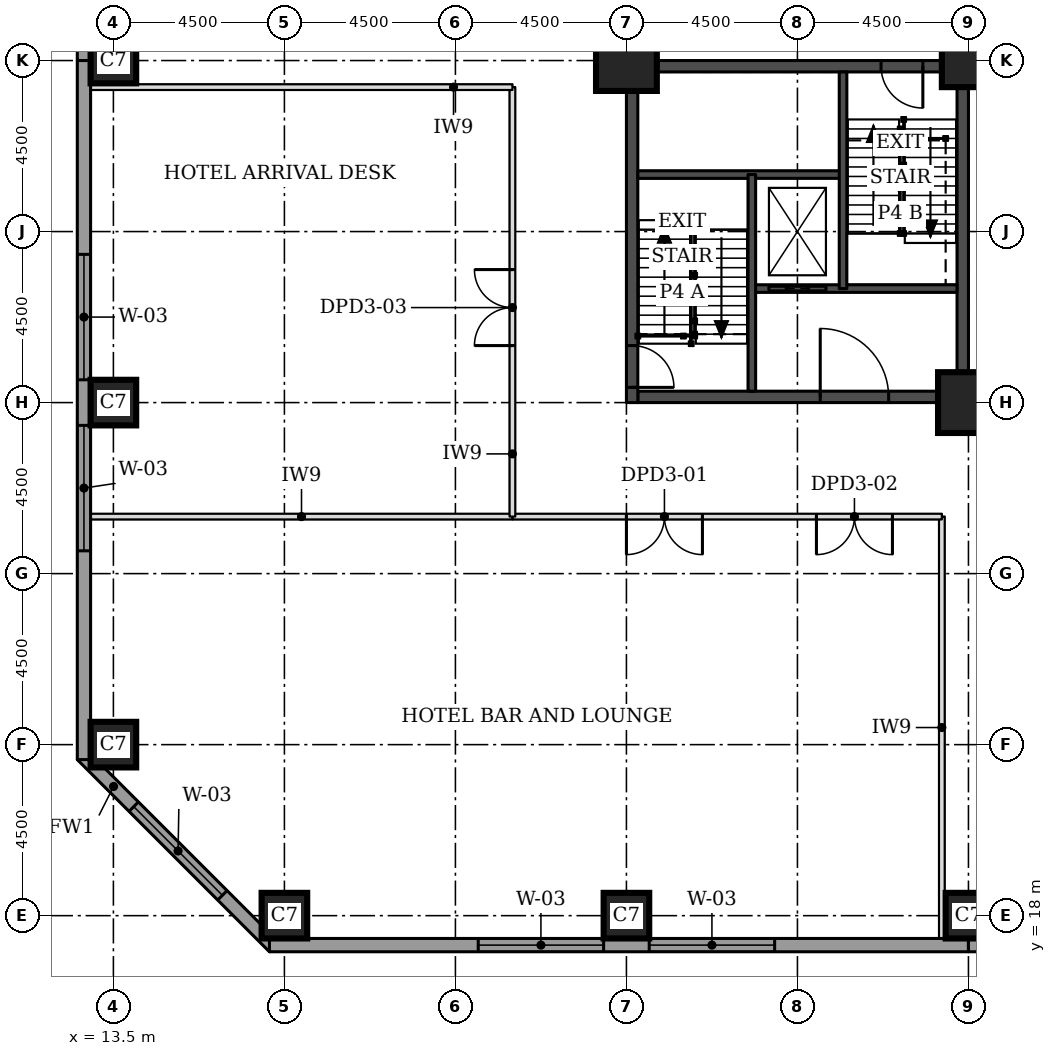
"""IFC4 building model, lengths in metres.
Left out: names, types, materials, properties, quantities, classifications, styles, units other than length and angle.
Written with IfcOpenShell. Run it as: python <this file> out.ifc"""

import sys

from ifc_helpers import new_model, si_unit, direction, frame, frame_2d, origin, origin_2d, place, context, subcontext, project, spatial, rectangle, extrude, element, fill, save


model = new_model("IFC4")
c1 = context("Model", 3, precision=1e-05, world=origin(), true_north=direction((0.0, 1.0)))
c2 = subcontext(c1, "Body", "Model", "MODEL_VIEW")
j1 = project(units=[si_unit("LENGTHUNIT", "METRE"), si_unit("PLANEANGLEUNIT", "RADIAN")], contexts=[c1])
p1 = place(None, origin())
s1 = spatial("IfcSite", under=j1, at=p1, CompositionType="ELEMENT")
p2 = place(p1, origin())
s2 = spatial("IfcBuilding", under=s1, at=p2, CompositionType="ELEMENT")
p3 = place(p2, frame((0.0, 0.0, 18.5)))
s3 = spatial("IfcBuildingStorey", under=s2, at=p3, CompositionType="ELEMENT", Elevation=18.5)
for number, where, z_axis, x_axis in (
    (1, (18.0, 18.0, 0.0), (0.0, 0.0, 1.0), (1.0, 0.0, 0.0)),
    (2, (27.0, 18.0, 0.0), (0.0, 0.0, 1.0), (1.0, 0.0, 0.0)),
    (3, (36.0, 18.0, 0.0), (0.0, 0.0, 1.0), (1.0, 0.0, 0.0)),
    (4, (13.5, 22.5, 0.0), (0.0, 0.0, 1.0), (1.0, 0.0, 0.0)),
    (5, (13.5, 31.5, 0.0), (0.0, 0.0, 1.0), (1.0, 0.0, 0.0)),
):
    element("IfcColumn", number, at=place(p3, frame(where, z_axis=z_axis, x_axis=x_axis)), inside=s3, PredefinedType="COLUMN", context=c2, shape_type="SweptSolid", body=[
        extrude(rectangle(XDim=1.2, YDim=1.2, at=origin_2d()), origin(), (0.0, 0.0, 1.0), 4.6),
    ])
p4 = place(p3, frame((36.0, 31.5, 0.0), z_axis=(0.0, 0.0, 1.0), x_axis=(1.0, 0.0, 0.0)))
e6 = element("IfcColumn", 6, at=p4, inside=s3, PredefinedType="COLUMN", context=c2, shape_type="SweptSolid", body=[
    extrude(rectangle(XDim=1.6, YDim=1.6, at=origin_2d()), origin(), (0.0, 0.0, 1.0), 4.6),
])
p5 = place(p3, frame((13.5, 40.5, 0.0), z_axis=(0.0, 0.0, 1.0), x_axis=(1.0, 0.0, 0.0)))
e7 = element("IfcColumn", 7, at=p5, inside=s3, PredefinedType="COLUMN", context=c2, shape_type="SweptSolid", body=[
    extrude(rectangle(XDim=1.2, YDim=1.2, at=origin_2d()), origin(), (0.0, 0.0, 1.0), 4.6),
])
p6 = place(p3, frame((27.0, 40.5, 0.0), z_axis=(0.0, 0.0, 1.0), x_axis=(1.0, 0.0, 0.0)))
e8 = element("IfcColumn", 8, at=p6, inside=s3, PredefinedType="COLUMN", context=c2, shape_type="SweptSolid", body=[
    extrude(rectangle(XDim=1.6, YDim=1.6, at=origin_2d()), origin(), (0.0, 0.0, 1.0), 4.6),
])
p7 = place(p3, frame((36.0, 40.5, 0.0), z_axis=(0.0, 0.0, 1.0), x_axis=(1.0, 0.0, 0.0)))
e9 = element("IfcColumn", 9, at=p7, inside=s3, PredefinedType="COLUMN", context=c2, shape_type="SweptSolid", body=[
    extrude(rectangle(XDim=1.4, YDim=1.4, at=origin_2d()), origin(), (0.0, 0.0, 1.0), 4.6),
])
p8 = place(p3, frame((27.3, 31.65, 0.0), z_axis=(0.0, 0.0, 1.0), x_axis=(1.0, 0.0, 0.0)))
e10 = element("IfcWall", 10, at=p8, inside=s3, PredefinedType="SHEAR", context=c2, shape_type="SweptSolid", body=[
    extrude(rectangle(XDim=8.4, YDim=0.3, at=frame_2d((4.2, 0.0))), origin(), (0.0, 0.0, 1.0), 4.6),
])
p9 = place(p8, frame((4.8, 0.0, 0.0)))
e11 = element("IfcOpeningElement", 11, at=p9, cuts=e10, PredefinedType="OPENING", context=c2, shape_type="SweptSolid", body=[
    extrude(rectangle(XDim=1.8, YDim=2.1, at=frame_2d((0.9, 1.05))), frame((0.0, 0.16, 0.0), z_axis=(0.0, -1.0, 0.0), x_axis=(1.0, 0.0, 0.0)), (0.0, 0.0, 1.0), 0.32),
])
p10 = place(p3, frame((27.3, 40.35, 0.0), z_axis=(0.0, 0.0, 1.0), x_axis=(1.0, 0.0, 0.0)))
e12 = element("IfcWall", 12, at=p10, inside=s3, PredefinedType="SHEAR", context=c2, shape_type="SweptSolid", body=[
    extrude(rectangle(XDim=8.4, YDim=0.3, at=frame_2d((4.2, 0.0))), origin(), (0.0, 0.0, 1.0), 4.6),
])
p11 = place(p10, frame((6.4, 0.0, 0.0)))
e13 = element("IfcOpeningElement", 13, at=p11, cuts=e12, PredefinedType="OPENING", context=c2, shape_type="SweptSolid", body=[
    extrude(rectangle(XDim=1.1, YDim=2.1, at=frame_2d((0.55, 1.05))), frame((0.0, 0.16, 0.0), z_axis=(0.0, -1.0, 0.0), x_axis=(1.0, 0.0, 0.0)), (0.0, 0.0, 1.0), 0.32),
])
p12 = place(p3, frame((27.15, 31.5, 0.0), z_axis=(0.0, 0.0, 1.0), x_axis=(0.0, 1.0, 0.0)))
e14 = element("IfcWall", 14, at=p12, inside=s3, PredefinedType="SHEAR", context=c2, shape_type="SweptSolid", body=[
    extrude(rectangle(XDim=9.0, YDim=0.3, at=frame_2d((4.5, 0.0))), origin(), (0.0, 0.0, 1.0), 4.6),
])
p13 = place(p12, frame((0.4, 0.0, 0.0)))
e15 = element("IfcOpeningElement", 15, at=p13, cuts=e14, PredefinedType="OPENING", context=c2, shape_type="SweptSolid", body=[
    extrude(rectangle(XDim=1.1, YDim=2.1, at=frame_2d((0.55, 1.05))), frame((0.0, 0.16, 0.0), z_axis=(0.0, -1.0, 0.0), x_axis=(1.0, 0.0, 0.0)), (0.0, 0.0, 1.0), 0.32),
])
p14 = place(p3, frame((35.85, 31.5, 0.0), z_axis=(0.0, 0.0, 1.0), x_axis=(0.0, 1.0, 0.0)))
e16 = element("IfcWall", 16, at=p14, inside=s3, PredefinedType="SHEAR", context=c2, shape_type="SweptSolid", body=[
    extrude(rectangle(XDim=9.0, YDim=0.3, at=frame_2d((4.5, 0.0))), origin(), (0.0, 0.0, 1.0), 4.6),
])
p15 = place(p3, frame((12.674, 22.23, 0.0), z_axis=(0.0, 0.0, 1.0), x_axis=(0.707106781187, -0.707106781187, 0.0)))
e17 = element("IfcWall", 17, at=p15, inside=s3, PredefinedType="STANDARD", context=c2, shape_type="SweptSolid", body=[
    extrude(rectangle(XDim=7.151, YDim=0.35, at=frame_2d((3.576, 0.0))), origin(), (0.0, 0.0, 1.0), 4.355),
])
p16 = place(p15, frame((1.926, 0.0, 0.9)))
e18 = element("IfcOpeningElement", 18, at=p16, cuts=e17, PredefinedType="OPENING", context=c2, shape_type="SweptSolid", body=[
    extrude(rectangle(XDim=3.3, YDim=2.7, at=frame_2d((1.65, 1.35))), frame((0.0, 0.185, 0.0), z_axis=(0.0, -1.0, 0.0), x_axis=(1.0, 0.0, 0.0)), (0.0, 0.0, 1.0), 0.37),
])
p17 = place(p3, frame((17.606, 17.225, 0.0), z_axis=(0.0, 0.0, 1.0), x_axis=(1.0, 0.0, 0.0)))
e19 = element("IfcWall", 19, at=p17, inside=s3, PredefinedType="STANDARD", context=c2, shape_type="SweptSolid", body=[
    extrude(rectangle(XDim=18.394, YDim=0.35, at=frame_2d((9.197, 0.0))), origin(), (0.0, 0.0, 1.0), 4.355),
])
p18 = place(p17, frame((5.493, 0.0, 0.9)))
e20 = element("IfcOpeningElement", 20, at=p18, cuts=e19, PredefinedType="OPENING", context=c2, shape_type="SweptSolid", body=[
    extrude(rectangle(XDim=3.3, YDim=2.7, at=frame_2d((1.65, 1.35))), frame((0.0, 0.185, 0.0), z_axis=(0.0, -1.0, 0.0), x_axis=(1.0, 0.0, 0.0)), (0.0, 0.0, 1.0), 0.37),
])
p19 = place(p17, frame((9.993, 0.0, 0.9)))
e21 = element("IfcOpeningElement", 21, at=p19, cuts=e19, PredefinedType="OPENING", context=c2, shape_type="SweptSolid", body=[
    extrude(rectangle(XDim=3.3, YDim=2.7, at=frame_2d((1.65, 1.35))), frame((0.0, 0.185, 0.0), z_axis=(0.0, -1.0, 0.0), x_axis=(1.0, 0.0, 0.0)), (0.0, 0.0, 1.0), 0.37),
])
p20 = place(p3, frame((36.0, 17.225, 0.0), z_axis=(0.0, 0.0, 1.0), x_axis=(1.0, 0.0, 0.0)))
e22 = element("IfcWall", 22, at=p20, inside=s3, PredefinedType="STANDARD", context=c2, shape_type="SweptSolid", body=[
    extrude(rectangle(XDim=18.394, YDim=0.35, at=frame_2d((9.197, 0.0))), origin(), (0.0, 0.0, 1.0), 4.355),
])
p21 = place(p20, frame((0.6, 0.0, 0.9)))
e23 = element("IfcOpeningElement", 23, at=p21, cuts=e22, PredefinedType="OPENING", context=c2, shape_type="SweptSolid", body=[
    extrude(rectangle(XDim=3.3, YDim=2.7, at=frame_2d((1.65, 1.35))), frame((0.0, 0.185, 0.0), z_axis=(0.0, -1.0, 0.0), x_axis=(1.0, 0.0, 0.0)), (0.0, 0.0, 1.0), 0.37),
])
p22 = place(p20, frame((5.1, 0.0, 0.9)))
e24 = element("IfcOpeningElement", 24, at=p22, cuts=e22, PredefinedType="OPENING", context=c2, shape_type="SweptSolid", body=[
    extrude(rectangle(XDim=3.3, YDim=2.7, at=frame_2d((1.65, 1.35))), frame((0.0, 0.185, 0.0), z_axis=(0.0, -1.0, 0.0), x_axis=(1.0, 0.0, 0.0)), (0.0, 0.0, 1.0), 0.37),
])
p23 = place(p20, frame((9.6, 0.0, 0.9)))
e25 = element("IfcOpeningElement", 25, at=p23, cuts=e22, PredefinedType="OPENING", context=c2, shape_type="SweptSolid", body=[
    extrude(rectangle(XDim=3.3, YDim=2.7, at=frame_2d((1.65, 1.35))), frame((0.0, 0.185, 0.0), z_axis=(0.0, -1.0, 0.0), x_axis=(1.0, 0.0, 0.0)), (0.0, 0.0, 1.0), 0.37),
])
p24 = place(p20, frame((14.1, 0.0, 0.9)))
e26 = element("IfcOpeningElement", 26, at=p24, cuts=e22, PredefinedType="OPENING", context=c2, shape_type="SweptSolid", body=[
    extrude(rectangle(XDim=3.3, YDim=2.7, at=frame_2d((1.65, 1.35))), frame((0.0, 0.185, 0.0), z_axis=(0.0, -1.0, 0.0), x_axis=(1.0, 0.0, 0.0)), (0.0, 0.0, 1.0), 0.37),
])
p25 = place(p3, frame((12.725, 58.894, 0.0), z_axis=(0.0, 0.0, 1.0), x_axis=(0.0, -1.0, 0.0)))
e27 = element("IfcWall", 27, at=p25, inside=s3, PredefinedType="STANDARD", context=c2, shape_type="SweptSolid", body=[
    extrude(rectangle(XDim=18.394, YDim=0.35, at=frame_2d((9.197, 0.0))), origin(), (0.0, 0.0, 1.0), 4.355),
])
p26 = place(p25, frame((5.493, 0.0, 0.9)))
e28 = element("IfcOpeningElement", 28, at=p26, cuts=e27, PredefinedType="OPENING", context=c2, shape_type="SweptSolid", body=[
    extrude(rectangle(XDim=3.3, YDim=2.7, at=frame_2d((1.65, 1.35))), frame((0.0, 0.185, 0.0), z_axis=(0.0, -1.0, 0.0), x_axis=(1.0, 0.0, 0.0)), (0.0, 0.0, 1.0), 0.37),
])
p27 = place(p25, frame((9.993, 0.0, 0.9)))
e29 = element("IfcOpeningElement", 29, at=p27, cuts=e27, PredefinedType="OPENING", context=c2, shape_type="SweptSolid", body=[
    extrude(rectangle(XDim=3.3, YDim=2.7, at=frame_2d((1.65, 1.35))), frame((0.0, 0.185, 0.0), z_axis=(0.0, -1.0, 0.0), x_axis=(1.0, 0.0, 0.0)), (0.0, 0.0, 1.0), 0.37),
])
p28 = place(p3, frame((12.725, 40.5, 0.0), z_axis=(0.0, 0.0, 1.0), x_axis=(0.0, -1.0, 0.0)))
e30 = element("IfcWall", 30, at=p28, inside=s3, PredefinedType="STANDARD", context=c2, shape_type="SweptSolid", body=[
    extrude(rectangle(XDim=18.394, YDim=0.35, at=frame_2d((9.197, 0.0))), origin(), (0.0, 0.0, 1.0), 4.355),
])
p29 = place(p28, frame((5.1, 0.0, 0.9)))
e31 = element("IfcOpeningElement", 31, at=p29, cuts=e30, PredefinedType="OPENING", context=c2, shape_type="SweptSolid", body=[
    extrude(rectangle(XDim=3.3, YDim=2.7, at=frame_2d((1.65, 1.35))), frame((0.0, 0.185, 0.0), z_axis=(0.0, -1.0, 0.0), x_axis=(1.0, 0.0, 0.0)), (0.0, 0.0, 1.0), 0.37),
])
p30 = place(p28, frame((9.6, 0.0, 0.9)))
e32 = element("IfcOpeningElement", 32, at=p30, cuts=e30, PredefinedType="OPENING", context=c2, shape_type="SweptSolid", body=[
    extrude(rectangle(XDim=3.3, YDim=2.7, at=frame_2d((1.65, 1.35))), frame((0.0, 0.185, 0.0), z_axis=(0.0, -1.0, 0.0), x_axis=(1.0, 0.0, 0.0)), (0.0, 0.0, 1.0), 0.37),
])
for number, where, z_axis, x_axis in (
    (33, (35.3, 17.4, 0.0), (0.0, 0.0, 1.0), (0.0, 1.0, 0.0)),
    (34, (12.9, 28.5, 0.0), (0.0, 0.0, 1.0), (1.0, 0.0, 0.0)),
):
    element("IfcWall", number, at=place(p3, frame(where, z_axis=z_axis, x_axis=x_axis)), inside=s3, PredefinedType="PARTITIONING", context=c2, shape_type="SweptSolid", body=[
        extrude(rectangle(XDim=11.1, YDim=0.15, at=frame_2d((5.55, 0.0))), origin(), (0.0, 0.0, 1.0), 4.38),
    ])
p31 = place(p3, frame((24.0, 28.5, 0.0), z_axis=(0.0, 0.0, 1.0), x_axis=(1.0, 0.0, 0.0)))
e35 = element("IfcWall", 35, at=p31, inside=s3, PredefinedType="PARTITIONING", context=c2, shape_type="SweptSolid", body=[
    extrude(rectangle(XDim=11.3, YDim=0.15, at=frame_2d((5.65, 0.0))), origin(), (0.0, 0.0, 1.0), 4.38),
])
p32 = place(p31, frame((3.0, 0.0, 0.0)))
e36 = element("IfcOpeningElement", 36, at=p32, cuts=e35, PredefinedType="OPENING", context=c2, shape_type="SweptSolid", body=[
    extrude(rectangle(XDim=2.0, YDim=2.1, at=frame_2d((1.0, 1.05))), frame((0.0, 0.085, 0.0), z_axis=(0.0, -1.0, 0.0), x_axis=(1.0, 0.0, 0.0)), (0.0, 0.0, 1.0), 0.17),
])
p33 = place(p31, frame((8.0, 0.0, 0.0)))
e37 = element("IfcOpeningElement", 37, at=p33, cuts=e35, PredefinedType="OPENING", context=c2, shape_type="SweptSolid", body=[
    extrude(rectangle(XDim=2.0, YDim=2.1, at=frame_2d((1.0, 1.05))), frame((0.0, 0.085, 0.0), z_axis=(0.0, -1.0, 0.0), x_axis=(1.0, 0.0, 0.0)), (0.0, 0.0, 1.0), 0.17),
])
p34 = place(p3, frame((24.0, 28.5, 0.0), z_axis=(0.0, 0.0, 1.0), x_axis=(0.0, 1.0, 0.0)))
e38 = element("IfcWall", 38, at=p34, inside=s3, PredefinedType="PARTITIONING", context=c2, shape_type="SweptSolid", body=[
    extrude(rectangle(XDim=11.3, YDim=0.15, at=frame_2d((5.65, 0.0))), origin(), (0.0, 0.0, 1.0), 4.38),
])
p35 = place(p34, frame((4.5, 0.0, 0.0)))
e39 = element("IfcOpeningElement", 39, at=p35, cuts=e38, PredefinedType="OPENING", context=c2, shape_type="SweptSolid", body=[
    extrude(rectangle(XDim=2.0, YDim=2.1, at=frame_2d((1.0, 1.05))), frame((0.0, 0.085, 0.0), z_axis=(0.0, -1.0, 0.0), x_axis=(1.0, 0.0, 0.0)), (0.0, 0.0, 1.0), 0.17),
])
p36 = place(p3, frame((12.9, 39.8, 0.0), z_axis=(0.0, 0.0, 1.0), x_axis=(1.0, 0.0, 0.0)))
e40 = element("IfcWall", 40, at=p36, inside=s3, PredefinedType="PARTITIONING", context=c2, shape_type="SweptSolid", body=[
    extrude(rectangle(XDim=11.1, YDim=0.15, at=frame_2d((5.55, 0.0))), origin(), (0.0, 0.0, 1.0), 4.38),
])
p37 = place(p3, frame((30.3, 34.5, 0.0), z_axis=(0.0, 0.0, 1.0), x_axis=(1.0, 0.0, 0.0)))
e41 = element("IfcWall", 41, at=p37, inside=s3, PredefinedType="SOLIDWALL", context=c2, shape_type="SweptSolid", body=[
    extrude(rectangle(XDim=5.4, YDim=0.2, at=frame_2d((2.7, 0.0))), origin(), (0.0, 0.0, 1.0), 4.38),
])
p38 = place(p37, frame((0.45, 0.0, 0.0)))
e42 = element("IfcOpeningElement", 42, at=p38, cuts=e41, PredefinedType="OPENING", context=c2, shape_type="SweptSolid", body=[
    extrude(rectangle(XDim=1.5, YDim=2.1, at=frame_2d((0.75, 1.05))), frame((0.0, 0.11, 0.0), z_axis=(0.0, -1.0, 0.0), x_axis=(1.0, 0.0, 0.0)), (0.0, 0.0, 1.0), 0.22),
])
p39 = place(p3, frame((27.3, 37.5, 0.0), z_axis=(0.0, 0.0, 1.0), x_axis=(1.0, 0.0, 0.0)))
e43 = element("IfcWall", 43, at=p39, inside=s3, PredefinedType="SOLIDWALL", context=c2, shape_type="SweptSolid", body=[
    extrude(rectangle(XDim=5.4, YDim=0.2, at=frame_2d((2.7, 0.0))), origin(), (0.0, 0.0, 1.0), 4.38),
])
for number, where, z_axis, x_axis in (
    (44, (30.3, 31.8, 0.0), (0.0, 0.0, 1.0), (0.0, 1.0, 0.0)),
    (45, (32.7, 34.5, 0.0), (0.0, 0.0, 1.0), (0.0, 1.0, 0.0)),
):
    element("IfcWall", number, at=place(p3, frame(where, z_axis=z_axis, x_axis=x_axis)), inside=s3, PredefinedType="SOLIDWALL", context=c2, shape_type="SweptSolid", body=[
        extrude(rectangle(XDim=5.7, YDim=0.2, at=frame_2d((2.85, 0.0))), origin(), (0.0, 0.0, 1.0), 4.38),
    ])
p40 = place(p16, origin())
e46 = element("IfcWindow", 46, at=p40, inside=s3, PartitioningType="SINGLE_PANEL", PredefinedType="WINDOW", context=c2, shape_type="SweptSolid", body=[
    extrude(rectangle(XDim=3.3, YDim=2.7, at=frame_2d((1.65, 1.35))), frame((0.0, 0.085, 0.0), z_axis=(0.0, -1.0, 0.0), x_axis=(1.0, 0.0, 0.0)), (0.0, 0.0, 1.0), 0.06),
])
fill(e18, e46)
p41 = place(p18, origin())
e47 = element("IfcWindow", 47, at=p41, inside=s3, PartitioningType="SINGLE_PANEL", PredefinedType="WINDOW", context=c2, shape_type="SweptSolid", body=[
    extrude(rectangle(XDim=3.3, YDim=2.7, at=frame_2d((1.65, 1.35))), frame((0.0, 0.085, 0.0), z_axis=(0.0, -1.0, 0.0), x_axis=(1.0, 0.0, 0.0)), (0.0, 0.0, 1.0), 0.06),
])
fill(e20, e47)
p42 = place(p19, origin())
e48 = element("IfcWindow", 48, at=p42, inside=s3, PartitioningType="SINGLE_PANEL", PredefinedType="WINDOW", context=c2, shape_type="SweptSolid", body=[
    extrude(rectangle(XDim=3.3, YDim=2.7, at=frame_2d((1.65, 1.35))), frame((0.0, 0.085, 0.0), z_axis=(0.0, -1.0, 0.0), x_axis=(1.0, 0.0, 0.0)), (0.0, 0.0, 1.0), 0.06),
])
fill(e21, e48)
p43 = place(p29, origin())
e49 = element("IfcWindow", 49, at=p43, inside=s3, PartitioningType="SINGLE_PANEL", PredefinedType="WINDOW", context=c2, shape_type="SweptSolid", body=[
    extrude(rectangle(XDim=3.3, YDim=2.7, at=frame_2d((1.65, 1.35))), frame((0.0, 0.085, 0.0), z_axis=(0.0, -1.0, 0.0), x_axis=(1.0, 0.0, 0.0)), (0.0, 0.0, 1.0), 0.06),
])
fill(e31, e49)
p44 = place(p30, origin())
e50 = element("IfcWindow", 50, at=p44, inside=s3, PartitioningType="SINGLE_PANEL", PredefinedType="WINDOW", context=c2, shape_type="SweptSolid", body=[
    extrude(rectangle(XDim=3.3, YDim=2.7, at=frame_2d((1.65, 1.35))), frame((0.0, 0.085, 0.0), z_axis=(0.0, -1.0, 0.0), x_axis=(1.0, 0.0, 0.0)), (0.0, 0.0, 1.0), 0.06),
])
fill(e32, e50)
p45 = place(p32, frame((2.0, 0.0, 0.0), z_axis=(0.0, 0.0, 1.0), x_axis=(-1.0, 0.0, 0.0)))
e51 = element("IfcDoor", 51, at=p45, inside=s3, OperationType="DOUBLE_DOOR_SINGLE_SWING", PredefinedType="DOOR", context=c2, shape_type="SweptSolid", body=[
    extrude(rectangle(XDim=2.0, YDim=2.1, at=frame_2d((1.0, 1.05))), frame((0.0, 0.025, 0.0), z_axis=(0.0, -1.0, 0.0), x_axis=(1.0, 0.0, 0.0)), (0.0, 0.0, 1.0), 0.05),
])
fill(e36, e51)
p46 = place(p33, frame((2.0, 0.0, 0.0), z_axis=(0.0, 0.0, 1.0), x_axis=(-1.0, 0.0, 0.0)))
e52 = element("IfcDoor", 52, at=p46, inside=s3, OperationType="DOUBLE_DOOR_SINGLE_SWING", PredefinedType="DOOR", context=c2, shape_type="SweptSolid", body=[
    extrude(rectangle(XDim=2.0, YDim=2.1, at=frame_2d((1.0, 1.05))), frame((0.0, 0.025, 0.0), z_axis=(0.0, -1.0, 0.0), x_axis=(1.0, 0.0, 0.0)), (0.0, 0.0, 1.0), 0.05),
])
fill(e37, e52)
p47 = place(p35, origin())
e53 = element("IfcDoor", 53, at=p47, inside=s3, OperationType="DOUBLE_DOOR_SINGLE_SWING", PredefinedType="DOOR", context=c2, shape_type="SweptSolid", body=[
    extrude(rectangle(XDim=2.0, YDim=2.1, at=frame_2d((1.0, 1.05))), frame((0.0, 0.025, 0.0), z_axis=(0.0, -1.0, 0.0), x_axis=(1.0, 0.0, 0.0)), (0.0, 0.0, 1.0), 0.05),
])
fill(e39, e53)
p48 = place(p13, frame((1.1, 0.0, 0.0), z_axis=(0.0, 0.0, 1.0), x_axis=(-1.0, 0.0, 0.0)))
e54 = element("IfcDoor", 54, at=p48, inside=s3, OperationType="SINGLE_SWING_RIGHT", PredefinedType="DOOR", context=c2, shape_type="SweptSolid", body=[
    extrude(rectangle(XDim=1.1, YDim=2.1, at=frame_2d((0.55, 1.05))), frame((0.0, 0.025, 0.0), z_axis=(0.0, -1.0, 0.0), x_axis=(1.0, 0.0, 0.0)), (0.0, 0.0, 1.0), 0.05),
])
fill(e15, e54)
p49 = place(p11, frame((1.1, 0.0, 0.0), z_axis=(0.0, 0.0, 1.0), x_axis=(-1.0, 0.0, 0.0)))
e55 = element("IfcDoor", 55, at=p49, inside=s3, OperationType="SINGLE_SWING_LEFT", PredefinedType="DOOR", context=c2, shape_type="SweptSolid", body=[
    extrude(rectangle(XDim=1.1, YDim=2.1, at=frame_2d((0.55, 1.05))), frame((0.0, 0.025, 0.0), z_axis=(0.0, -1.0, 0.0), x_axis=(1.0, 0.0, 0.0)), (0.0, 0.0, 1.0), 0.05),
])
fill(e13, e55)
p50 = place(p38, origin())
e56 = element("IfcDoor", 56, at=p50, inside=s3, OperationType="DOUBLE_DOOR_SLIDING", PredefinedType="DOOR", context=c2, shape_type="SweptSolid", body=[
    extrude(rectangle(XDim=1.5, YDim=2.1, at=frame_2d((0.75, 1.05))), frame((0.0, 0.025, 0.0), z_axis=(0.0, -1.0, 0.0), x_axis=(1.0, 0.0, 0.0)), (0.0, 0.0, 1.0), 0.05),
])
fill(e42, e56)
p51 = place(p9, origin())
e57 = element("IfcDoor", 57, at=p51, inside=s3, OperationType="SINGLE_SWING_LEFT", PredefinedType="DOOR", context=c2, shape_type="SweptSolid", body=[
    extrude(rectangle(XDim=1.8, YDim=2.1, at=frame_2d((0.9, 1.05))), frame((0.0, 0.025, 0.0), z_axis=(0.0, -1.0, 0.0), x_axis=(1.0, 0.0, 0.0)), (0.0, 0.0, 1.0), 0.05),
])
fill(e11, e57)
save(model, sys.argv[1])
